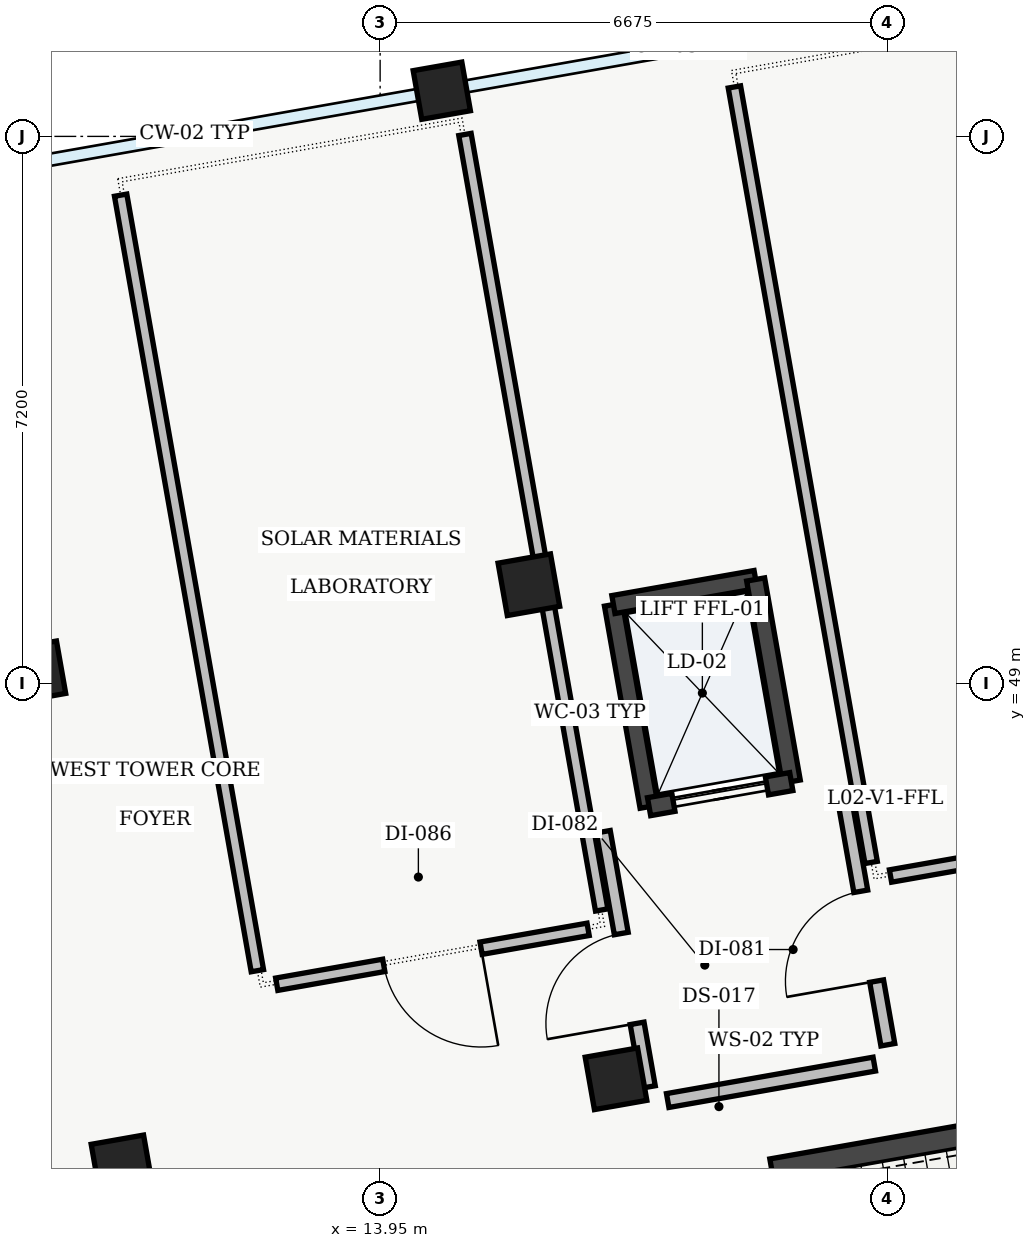
"""IFC4 building model, lengths in metres.
Left out: names, types, materials, properties, quantities, classifications, styles, units other than length and angle.
Written with IfcOpenShell. Run it as: python <this file> out.ifc"""

import sys

from ifc_helpers import new_model, si_unit, direction, frame, frame_2d, origin, origin_2d, place, context, subcontext, project, spatial, rectangle, extrude, element, fill, save


model = new_model("IFC4")
c1 = context("Model", 3, precision=1e-05, world=origin(), true_north=direction((0.0, 1.0)))
c2 = subcontext(c1, "Body", "Model", "MODEL_VIEW")
j1 = project(units=[si_unit("LENGTHUNIT", "METRE"), si_unit("PLANEANGLEUNIT", "RADIAN")], contexts=[c1])
p1 = place(None, origin())
s1 = spatial("IfcSite", under=j1, at=p1, CompositionType="ELEMENT")
p2 = place(p1, origin())
s2 = spatial("IfcBuilding", under=s1, at=p2, CompositionType="ELEMENT")
p3 = place(p2, frame((0.0, 0.0, 9.6)))
s3 = spatial("IfcBuildingStorey", under=s2, at=p3, CompositionType="ELEMENT", Elevation=9.6)
for number, where, z_axis, x_axis in (
    (1, (10.554, 42.656, 0.0), (0.0, 0.0, 1.0), (0.985, 0.174, 0.0)),
    (2, (9.407, 49.156, 0.0), (0.0, 0.0, 1.0), (0.985, 0.174, 0.0)),
    (3, (17.053, 43.802, 0.0), (0.0, 0.0, 1.0), (0.985, 0.174, 0.0)),
    (4, (15.907, 50.302, 0.0), (0.0, 0.0, 1.0), (0.985, 0.174, 0.0)),
):
    element("IfcColumn", number, at=place(p3, frame(where, z_axis=z_axis, x_axis=x_axis)), inside=s3, PredefinedType="COLUMN", context=c2, shape_type="SweptSolid", body=[
        extrude(rectangle(XDim=0.7, YDim=0.7, at=origin_2d()), origin(), (0.0, 0.0, 1.0), 4.32),
    ])
p4 = place(p3, frame((14.761, 56.801, 0.0), z_axis=(0.0, 0.0, 1.0), x_axis=(0.984807753012, 0.173648177667, 0.0)))
e5 = element("IfcColumn", 5, at=p4, inside=s3, PredefinedType="COLUMN", context=c2, shape_type="SweptSolid", body=[
    extrude(rectangle(XDim=0.65, YDim=0.65, at=origin_2d()), origin(), (0.0, 0.0, 1.0), 4.32),
])
p5 = place(p3, frame((17.863, 42.381, 0.0), z_axis=(0.0, 0.0, 1.0), x_axis=(0.984808225754, 0.173645496596, 0.0)))
e6 = element("IfcWall", 6, at=p5, inside=s3, PredefinedType="SHEAR", context=c2, shape_type="SweptSolid", body=[
    extrude(rectangle(XDim=7.47, YDim=0.3, at=frame_2d((3.735, 0.0))), origin(), (0.0, 0.0, 1.0), 4.28),
])
p6 = place(p5, frame((0.18, 0.0, 0.0)))
e7 = element("IfcOpeningElement", 7, at=p6, cuts=e6, PredefinedType="OPENING", context=c2, shape_type="SweptSolid", body=[
    extrude(rectangle(XDim=1.08, YDim=2.15, at=frame_2d((0.54, 1.075))), frame((0.0, 0.15, 0.0), z_axis=(0.0, -1.0, 0.0), x_axis=(1.0, 0.0, 0.0)), (0.0, 0.0, 1.0), 0.3),
])
p7 = place(p3, frame((17.488, 47.382, 0.0), z_axis=(0.0, 0.0, 1.0), x_axis=(-0.173615102578, 0.98481358447, 0.0)))
e8 = element("IfcWall", 8, at=p7, inside=s3, PredefinedType="SHEAR", context=c2, shape_type="SweptSolid", body=[
    extrude(rectangle(XDim=2.7, YDim=0.24, at=frame_2d((1.35, 0.0))), origin(), (0.0, 0.0, 1.0), 4.28),
])
p8 = place(p3, frame((17.02, 50.041, 0.0), z_axis=(0.0, 0.0, 1.0), x_axis=(0.984815882103, 0.173602068988, 0.0)))
e9 = element("IfcWall", 9, at=p8, inside=s3, PredefinedType="SHEAR", context=c2, shape_type="SweptSolid", body=[
    extrude(rectangle(XDim=1.9, YDim=0.24, at=frame_2d((0.95, 0.0))), origin(), (0.0, 0.0, 1.0), 4.28),
])
p9 = place(p3, frame((18.891, 50.371, 0.0), z_axis=(0.0, 0.0, 1.0), x_axis=(0.173615102578, -0.98481358447, 0.0)))
e10 = element("IfcWall", 10, at=p9, inside=s3, PredefinedType="SHEAR", context=c2, shape_type="SweptSolid", body=[
    extrude(rectangle(XDim=2.7, YDim=0.24, at=frame_2d((1.35, 0.0))), origin(), (0.0, 0.0, 1.0), 4.28),
])
p10 = place(p3, frame((19.359, 47.712, 0.0), z_axis=(0.0, 0.0, 1.0), x_axis=(-0.984815882103, -0.173602068988, 0.0)))
e11 = element("IfcWall", 11, at=p10, inside=s3, PredefinedType="SHEAR", context=c2, shape_type="SweptSolid", body=[
    extrude(rectangle(XDim=1.9, YDim=0.24, at=frame_2d((0.95, 0.0))), origin(), (0.0, 0.0, 1.0), 4.28),
])
p11 = place(p10, frame((0.325, 0.0, 0.0)))
e12 = element("IfcOpeningElement", 12, at=p11, cuts=e11, PredefinedType="OPENING", context=c2, shape_type="SweptSolid", body=[
    extrude(rectangle(XDim=1.25, YDim=2.2, at=frame_2d((0.625, 1.1))), frame((0.0, 0.12, 0.0), z_axis=(0.0, -1.0, 0.0), x_axis=(1.0, 0.0, 0.0)), (0.0, 0.0, 1.0), 0.24),
])
p12 = place(p3, frame((17.733, 43.516, 0.0), z_axis=(0.0, 0.0, 1.0), x_axis=(0.984808483292, 0.173644035992, 0.0)))
e13 = element("IfcWall", 13, at=p12, inside=s3, PredefinedType="SOLIDWALL", context=c2, shape_type="SweptSolid", body=[
    extrude(rectangle(XDim=2.76, YDim=0.185, at=frame_2d((1.38, 0.0))), origin(), (0.0, 0.0, 1.0), 3.95),
])
p13 = place(p3, frame((20.63, 44.25, 0.0), z_axis=(0.0, 0.0, 1.0), x_axis=(-0.173621956536, 0.984812376145, 0.0)))
e14 = element("IfcWall", 14, at=p13, inside=s3, PredefinedType="SOLIDWALL", context=c2, shape_type="SweptSolid", body=[
    extrude(rectangle(XDim=3.41, YDim=0.185, at=frame_2d((1.705, 0.0))), origin(), (0.0, 0.0, 1.0), 3.95),
])
p14 = place(p13, frame((0.85, 0.0, 0.0)))
e15 = element("IfcOpeningElement", 15, at=p14, cuts=e14, PredefinedType="OPENING", context=c2, shape_type="SweptSolid", body=[
    extrude(rectangle(XDim=1.2, YDim=2.15, at=frame_2d((0.6, 1.075))), frame((0.0, 0.093, 0.0), z_axis=(0.0, -1.0, 0.0), x_axis=(1.0, 0.0, 0.0)), (0.0, 0.0, 1.0), 0.185),
])
p15 = place(p3, frame((16.886, 47.052, 0.0), z_axis=(0.0, 0.0, 1.0), x_axis=(0.173621956536, -0.984812376145, 0.0)))
e16 = element("IfcWall", 16, at=p15, inside=s3, PredefinedType="SOLIDWALL", context=c2, shape_type="SweptSolid", body=[
    extrude(rectangle(XDim=3.41, YDim=0.185, at=frame_2d((1.705, 0.0))), origin(), (0.0, 0.0, 1.0), 3.95),
])
p16 = place(p15, frame((1.36, 0.0, 0.0)))
e17 = element("IfcOpeningElement", 17, at=p16, cuts=e16, PredefinedType="OPENING", context=c2, shape_type="SweptSolid", body=[
    extrude(rectangle(XDim=1.2, YDim=2.15, at=frame_2d((0.6, 1.075))), frame((0.0, 0.093, 0.0), z_axis=(0.0, -1.0, 0.0), x_axis=(1.0, 0.0, 0.0)), (0.0, 0.0, 1.0), 0.185),
])
p17 = place(p3, frame((12.59, 45.046, 0.0), z_axis=(0.0, 0.0, 1.0), x_axis=(0.984805411783, 0.173661454915, 0.0)))
e18 = element("IfcWall", 18, at=p17, inside=s3, PredefinedType="PARTITIONING", context=c2, shape_type="SweptSolid", body=[
    extrude(rectangle(XDim=4.16, YDim=0.165, at=frame_2d((2.08, 0.0))), origin(), (0.0, 0.0, 1.0), 3.855),
])
p18 = place(p17, frame((1.43, 0.0, 0.0)))
e19 = element("IfcOpeningElement", 19, at=p18, cuts=e18, PredefinedType="OPENING", context=c2, shape_type="SweptSolid", body=[
    extrude(rectangle(XDim=1.3, YDim=2.1, at=frame_2d((0.65, 1.05))), frame((0.0, 0.083, 0.0), z_axis=(0.0, -1.0, 0.0), x_axis=(1.0, 0.0, 0.0)), (0.0, 0.0, 1.0), 0.165),
])
p19 = place(p3, frame((16.865, 46.023, 0.0), z_axis=(0.0, 0.0, 1.0), x_axis=(-0.173632075677, 0.984810592092, 0.0)))
e20 = element("IfcWall", 20, at=p19, inside=s3, PredefinedType="PARTITIONING", context=c2, shape_type="SweptSolid", body=[
    extrude(rectangle(XDim=10.36, YDim=0.165, at=frame_2d((5.18, 0.0))), origin(), (0.0, 0.0, 1.0), 3.655),
])
p20 = place(p3, frame((10.536, 55.427, 0.0), z_axis=(0.0, 0.0, 1.0), x_axis=(0.173654930775, -0.984806562233, 0.0)))
e21 = element("IfcWall", 21, at=p20, inside=s3, PredefinedType="PARTITIONING", context=c2, shape_type="SweptSolid", body=[
    extrude(rectangle(XDim=10.36, YDim=0.165, at=frame_2d((5.18, 0.0))), origin(), (0.0, 0.0, 1.0), 3.95),
])
p21 = place(p3, frame((20.665, 46.469, 0.0), z_axis=(0.0, 0.0, 1.0), x_axis=(0.984807841198, 0.173647677539, 0.0)))
e22 = element("IfcWall", 22, at=p21, inside=s3, PredefinedType="PARTITIONING", context=c2, shape_type="SweptSolid", body=[
    extrude(rectangle(XDim=13.76, YDim=0.165, at=frame_2d((6.88, 0.0))), origin(), (0.0, 0.0, 1.0), 3.855),
])
p22 = place(p21, frame((6.215, 0.0, 0.0)))
e23 = element("IfcOpeningElement", 23, at=p22, cuts=e22, PredefinedType="OPENING", context=c2, shape_type="SweptSolid", body=[
    extrude(rectangle(XDim=1.33, YDim=2.12, at=frame_2d((0.665, 1.06))), frame((0.0, 0.083, 0.0), z_axis=(0.0, -1.0, 0.0), x_axis=(1.0, 0.0, 0.0)), (0.0, 0.0, 1.0), 0.165),
])
p23 = place(p3, frame((18.611, 56.851, 0.0), z_axis=(0.0, 0.0, 1.0), x_axis=(0.173654930775, -0.984806562233, 0.0)))
e24 = element("IfcWall", 24, at=p23, inside=s3, PredefinedType="PARTITIONING", context=c2, shape_type="SweptSolid", body=[
    extrude(rectangle(XDim=10.36, YDim=0.165, at=frame_2d((5.18, 0.0))), origin(), (0.0, 0.0, 1.0), 3.95),
])
p24 = place(p6, origin())
e25 = element("IfcDoor", 25, at=p24, inside=s3, OperationType="SINGLE_SWING_RIGHT", PredefinedType="DOOR", context=c2, shape_type="SweptSolid", body=[
    extrude(rectangle(XDim=1.08, YDim=2.15, at=frame_2d((0.54, 1.075))), frame((0.0, 0.025, 0.0), z_axis=(0.0, -1.0, 0.0), x_axis=(1.0, 0.0, 0.0)), (0.0, 0.0, 1.0), 0.05),
])
fill(e7, e25)
p25 = place(p11, origin())
e26 = element("IfcDoor", 26, at=p25, inside=s3, OperationType="SLIDING_TO_RIGHT", PredefinedType="DOOR", context=c2, shape_type="SweptSolid", body=[
    extrude(rectangle(XDim=1.25, YDim=2.2, at=frame_2d((0.625, 1.1))), frame((0.0, 0.025, 0.0), z_axis=(0.0, -1.0, 0.0), x_axis=(1.0, 0.0, 0.0)), (0.0, 0.0, 1.0), 0.05),
])
fill(e12, e26)
p26 = place(p14, origin())
e27 = element("IfcDoor", 27, at=p26, inside=s3, OperationType="SINGLE_SWING_LEFT", PredefinedType="DOOR", context=c2, shape_type="SweptSolid", body=[
    extrude(rectangle(XDim=1.2, YDim=2.15, at=frame_2d((0.6, 1.075))), frame((0.0, 0.025, 0.0), z_axis=(0.0, -1.0, 0.0), x_axis=(1.0, 0.0, 0.0)), (0.0, 0.0, 1.0), 0.05),
])
fill(e15, e27)
p27 = place(p16, origin())
e28 = element("IfcDoor", 28, at=p27, inside=s3, OperationType="SINGLE_SWING_RIGHT", PredefinedType="DOOR", context=c2, shape_type="SweptSolid", body=[
    extrude(rectangle(XDim=1.2, YDim=2.15, at=frame_2d((0.6, 1.075))), frame((0.0, 0.025, 0.0), z_axis=(0.0, -1.0, 0.0), x_axis=(1.0, 0.0, 0.0)), (0.0, 0.0, 1.0), 0.05),
])
fill(e17, e28)
p28 = place(p18, origin())
e29 = element("IfcDoor", 29, at=p28, inside=s3, OperationType="SINGLE_SWING_RIGHT", PredefinedType="DOOR", context=c2, shape_type="SweptSolid", body=[
    extrude(rectangle(XDim=1.3, YDim=2.1, at=frame_2d((0.65, 1.05))), frame((0.0, 0.025, 0.0), z_axis=(0.0, -1.0, 0.0), x_axis=(1.0, 0.0, 0.0)), (0.0, 0.0, 1.0), 0.05),
])
fill(e19, e29)
save(model, sys.argv[1])
